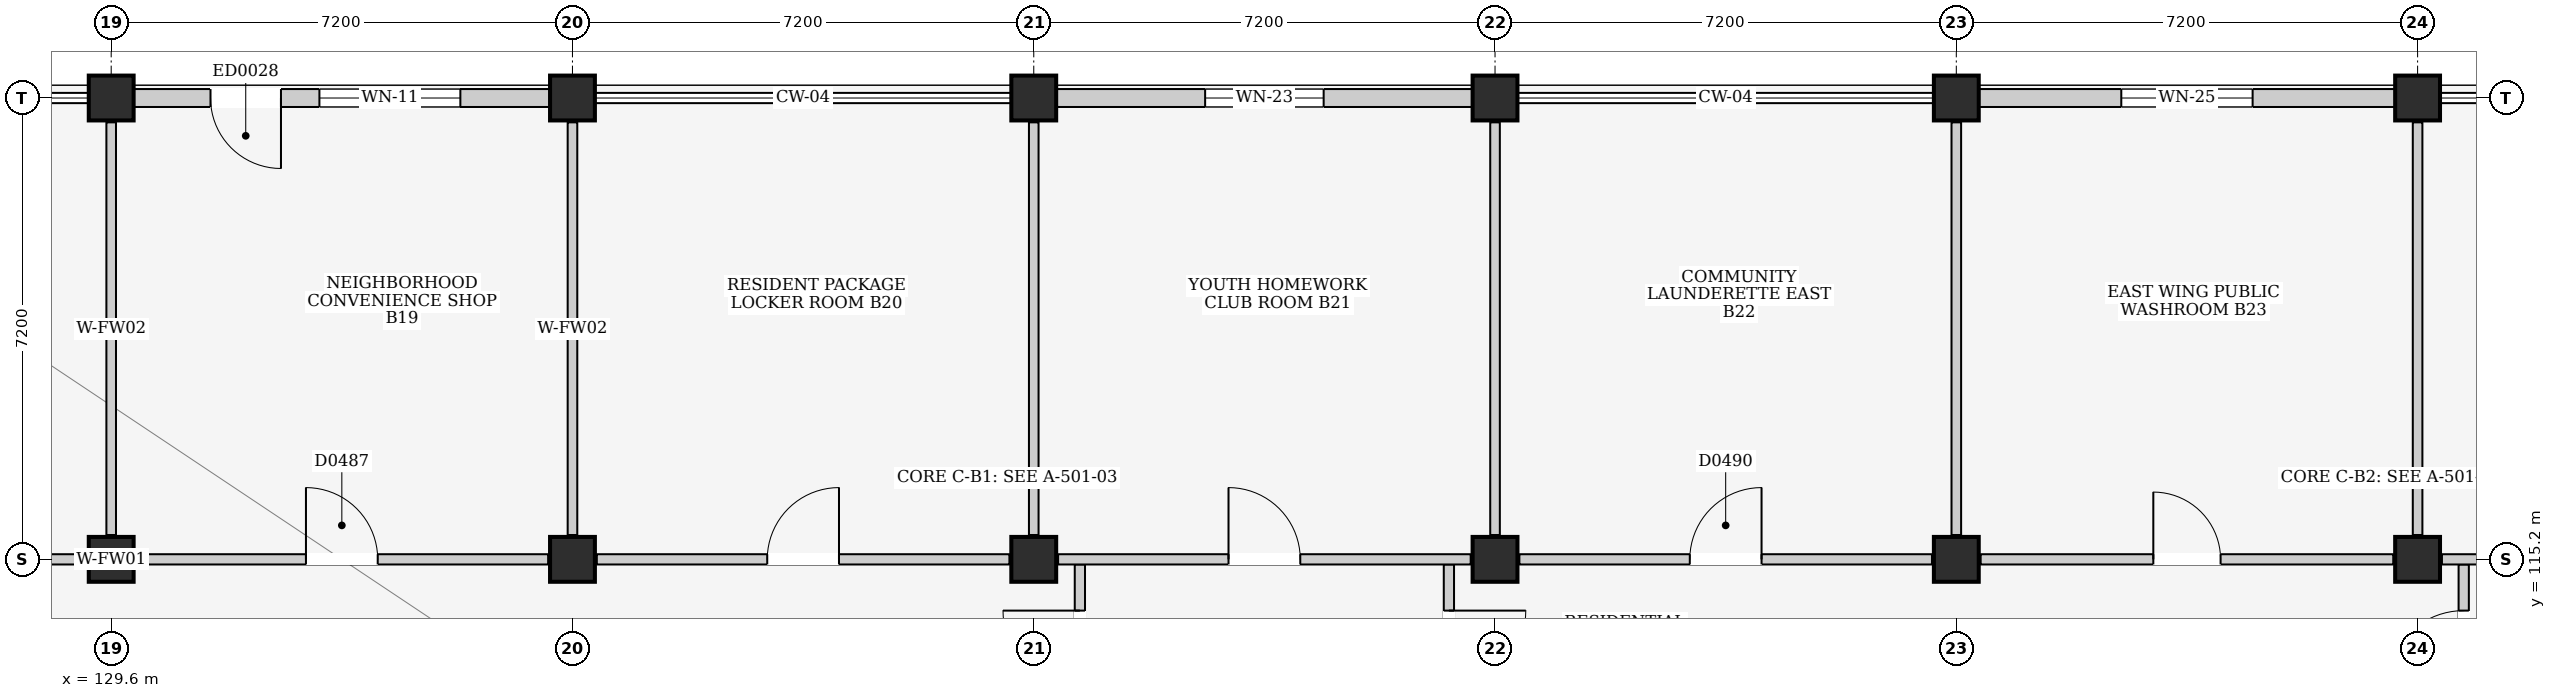
"""IFC4 building model, lengths in metres.
Left out: names, types, materials, properties, quantities, classifications, styles, units other than length and angle.
Written with IfcOpenShell. Run it as: python <this file> out.ifc"""

import sys

from ifc_helpers import new_model, si_unit, direction, frame, frame_2d, origin, origin_2d, place, context, subcontext, project, spatial, rectangle, extrude, element, fill, save


model = new_model("IFC4")
c1 = context("Model", 3, precision=1e-05, world=origin(), true_north=direction((0.0, 1.0)))
c2 = subcontext(c1, "Body", "Model", "MODEL_VIEW")
j1 = project(units=[si_unit("LENGTHUNIT", "METRE"), si_unit("PLANEANGLEUNIT", "RADIAN")], contexts=[c1])
p1 = place(None, origin())
s1 = spatial("IfcSite", under=j1, at=p1, CompositionType="ELEMENT")
p2 = place(p1, origin())
s2 = spatial("IfcBuilding", under=s1, at=p2, CompositionType="ELEMENT")
p3 = place(p2, origin())
s3 = spatial("IfcBuildingStorey", under=s2, at=p3, CompositionType="ELEMENT", Elevation=0.0)
for number, where, z_axis, x_axis in (
    (1, (129.6, 115.2, 0.0), (0.0, 0.0, 1.0), (1.0, 0.0, 0.0)),
    (2, (129.6, 122.4, 0.0), (0.0, 0.0, 1.0), (1.0, 0.0, 0.0)),
    (3, (136.8, 115.2, 0.0), (0.0, 0.0, 1.0), (1.0, 0.0, 0.0)),
    (4, (136.8, 122.4, 0.0), (0.0, 0.0, 1.0), (1.0, 0.0, 0.0)),
    (5, (144.0, 115.2, 0.0), (0.0, 0.0, 1.0), (1.0, 0.0, 0.0)),
    (6, (144.0, 122.4, 0.0), (0.0, 0.0, 1.0), (1.0, 0.0, 0.0)),
    (7, (151.2, 115.2, 0.0), (0.0, 0.0, 1.0), (1.0, 0.0, 0.0)),
    (8, (151.2, 122.4, 0.0), (0.0, 0.0, 1.0), (1.0, 0.0, 0.0)),
    (9, (158.4, 115.2, 0.0), (0.0, 0.0, 1.0), (1.0, 0.0, 0.0)),
    (10, (158.4, 122.4, 0.0), (0.0, 0.0, 1.0), (1.0, 0.0, 0.0)),
    (11, (165.6, 115.2, 0.0), (0.0, 0.0, 1.0), (1.0, 0.0, 0.0)),
    (12, (165.6, 122.4, 0.0), (0.0, 0.0, 1.0), (1.0, 0.0, 0.0)),
):
    element("IfcColumn", number, at=place(p3, frame(where, z_axis=z_axis, x_axis=x_axis)), inside=s3, PredefinedType="COLUMN", context=c2, shape_type="SweptSolid", body=[
        extrude(rectangle(XDim=0.7, YDim=0.7, at=origin_2d()), origin(), (0.0, 0.0, 1.0), 4.5),
    ])
p4 = place(p3, frame((129.95, 122.4, 0.0), z_axis=(0.0, 0.0, 1.0), x_axis=(1.0, 0.0, 0.0)))
e13 = element("IfcWall", 13, at=p4, inside=s3, PredefinedType="ELEMENTEDWALL", context=c2, shape_type="SweptSolid", body=[
    extrude(rectangle(XDim=6.5, YDim=0.28, at=frame_2d((3.25, 0.0))), origin(), (0.0, 0.0, 1.0), 3.665),
])
p5 = place(p4, frame((1.2, 0.0, 0.0)))
e14 = element("IfcOpeningElement", 14, at=p5, cuts=e13, PredefinedType="OPENING", context=c2, shape_type="SweptSolid", body=[
    extrude(rectangle(XDim=1.1, YDim=2.2, at=frame_2d((0.55, 1.1))), frame((0.0, 0.155, 0.0), z_axis=(0.0, -1.0, 0.0), x_axis=(1.0, 0.0, 0.0)), (0.0, 0.0, 1.0), 0.31),
])
p6 = place(p4, frame((2.9, 0.0, 0.85)))
e15 = element("IfcOpeningElement", 15, at=p6, cuts=e13, PredefinedType="OPENING", context=c2, shape_type="SweptSolid", body=[
    extrude(rectangle(XDim=2.2, YDim=1.8, at=frame_2d((1.1, 0.9))), frame((0.0, 0.155, 0.0), z_axis=(0.0, -1.0, 0.0), x_axis=(1.0, 0.0, 0.0)), (0.0, 0.0, 1.0), 0.31),
])
p7 = place(p3, frame((144.35, 122.4, 0.0), z_axis=(0.0, 0.0, 1.0), x_axis=(1.0, 0.0, 0.0)))
e16 = element("IfcWall", 16, at=p7, inside=s3, PredefinedType="ELEMENTEDWALL", context=c2, shape_type="SweptSolid", body=[
    extrude(rectangle(XDim=6.5, YDim=0.28, at=frame_2d((3.25, 0.0))), origin(), (0.0, 0.0, 1.0), 3.665),
])
p8 = place(p7, frame((2.325, 0.0, 0.95)))
e17 = element("IfcOpeningElement", 17, at=p8, cuts=e16, PredefinedType="OPENING", context=c2, shape_type="SweptSolid", body=[
    extrude(rectangle(XDim=1.85, YDim=1.4, at=frame_2d((0.925, 0.7))), frame((0.0, 0.155, 0.0), z_axis=(0.0, -1.0, 0.0), x_axis=(1.0, 0.0, 0.0)), (0.0, 0.0, 1.0), 0.31),
])
p9 = place(p3, frame((158.75, 122.4, 0.0), z_axis=(0.0, 0.0, 1.0), x_axis=(1.0, 0.0, 0.0)))
e18 = element("IfcWall", 18, at=p9, inside=s3, PredefinedType="ELEMENTEDWALL", context=c2, shape_type="SweptSolid", body=[
    extrude(rectangle(XDim=6.5, YDim=0.28, at=frame_2d((3.25, 0.0))), origin(), (0.0, 0.0, 1.0), 3.665),
])
p10 = place(p9, frame((2.225, 0.0, 0.95)))
e19 = element("IfcOpeningElement", 19, at=p10, cuts=e18, PredefinedType="OPENING", context=c2, shape_type="SweptSolid", body=[
    extrude(rectangle(XDim=2.05, YDim=1.6, at=frame_2d((1.025, 0.8))), frame((0.0, 0.155, 0.0), z_axis=(0.0, -1.0, 0.0), x_axis=(1.0, 0.0, 0.0)), (0.0, 0.0, 1.0), 0.31),
])
p11 = place(p3, frame((144.72, 111.1, 0.0), z_axis=(0.0, 0.0, 1.0), x_axis=(0.0, 1.0, 0.0)))
e20 = element("IfcWall", 20, at=p11, inside=s3, PredefinedType="PARTITIONING", context=c2, shape_type="SweptSolid", body=[
    extrude(rectangle(XDim=4.02, YDim=0.16, at=frame_2d((2.01, 0.0))), origin(), (0.0, 0.0, 1.0), 4.2),
])
p12 = place(p11, frame((2.1, 0.0, 0.0)))
e21 = element("IfcOpeningElement", 21, at=p12, cuts=e20, PredefinedType="OPENING", context=c2, shape_type="SweptSolid", body=[
    extrude(rectangle(XDim=1.2, YDim=2.2, at=frame_2d((0.6, 1.1))), frame((0.0, 0.095, 0.0), z_axis=(0.0, -1.0, 0.0), x_axis=(1.0, 0.0, 0.0)), (0.0, 0.0, 1.0), 0.19),
])
p13 = place(p3, frame((150.48, 111.1, 0.0), z_axis=(0.0, 0.0, 1.0), x_axis=(0.0, 1.0, 0.0)))
e22 = element("IfcWall", 22, at=p13, inside=s3, PredefinedType="PARTITIONING", context=c2, shape_type="SweptSolid", body=[
    extrude(rectangle(XDim=4.02, YDim=0.16, at=frame_2d((2.01, 0.0))), origin(), (0.0, 0.0, 1.0), 4.2),
])
p14 = place(p13, frame((2.1, 0.0, 0.0)))
e23 = element("IfcOpeningElement", 23, at=p14, cuts=e22, PredefinedType="OPENING", context=c2, shape_type="SweptSolid", body=[
    extrude(rectangle(XDim=1.2, YDim=2.2, at=frame_2d((0.6, 1.1))), frame((0.0, 0.095, 0.0), z_axis=(0.0, -1.0, 0.0), x_axis=(1.0, 0.0, 0.0)), (0.0, 0.0, 1.0), 0.19),
])
p15 = place(p3, frame((166.32, 110.8, 0.0), z_axis=(0.0, 0.0, 1.0), x_axis=(0.0, 1.0, 0.0)))
e24 = element("IfcWall", 24, at=p15, inside=s3, PredefinedType="PARTITIONING", context=c2, shape_type="SweptSolid", body=[
    extrude(rectangle(XDim=4.32, YDim=0.16, at=frame_2d((2.16, 0.0))), origin(), (0.0, 0.0, 1.0), 4.2),
])
p16 = place(p15, frame((2.4, 0.0, 0.0)))
e25 = element("IfcOpeningElement", 25, at=p16, cuts=e24, PredefinedType="OPENING", context=c2, shape_type="SweptSolid", body=[
    extrude(rectangle(XDim=1.2, YDim=2.2, at=frame_2d((0.6, 1.1))), frame((0.0, 0.095, 0.0), z_axis=(0.0, -1.0, 0.0), x_axis=(1.0, 0.0, 0.0)), (0.0, 0.0, 1.0), 0.19),
])
p17 = place(p3, frame((122.78, 115.2, 0.0), z_axis=(0.0, 0.0, 1.0), x_axis=(1.0, 0.0, 0.0)))
e26 = element("IfcWall", 26, at=p17, inside=s3, PredefinedType="PARTITIONING", context=c2, shape_type="SweptSolid", body=[
    extrude(rectangle(XDim=6.44, YDim=0.16, at=frame_2d((3.22, 0.0))), origin(), (0.0, 0.0, 1.0), 3.435),
])
p18 = place(p17, frame((2.76, 0.0, 0.0)))
e27 = element("IfcOpeningElement", 27, at=p18, cuts=e26, PredefinedType="OPENING", context=c2, shape_type="SweptSolid", body=[
    extrude(rectangle(XDim=1.12, YDim=2.2, at=frame_2d((0.56, 1.1))), frame((0.0, 0.095, 0.0), z_axis=(0.0, -1.0, 0.0), x_axis=(1.0, 0.0, 0.0)), (0.0, 0.0, 1.0), 0.19),
])
p19 = place(p3, frame((129.6, 115.58, 0.0), z_axis=(0.0, 0.0, 1.0), x_axis=(0.0, 1.0, 0.0)))
e28 = element("IfcWall", 28, at=p19, inside=s3, PredefinedType="PARTITIONING", context=c2, shape_type="SweptSolid", body=[
    extrude(rectangle(XDim=6.44, YDim=0.15, at=frame_2d((3.22, 0.0))), origin(), (0.0, 0.0, 1.0), 3.435),
])
p20 = place(p3, frame((129.98, 115.2, 0.0), z_axis=(0.0, 0.0, 1.0), x_axis=(1.0, 0.0, 0.0)))
e29 = element("IfcWall", 29, at=p20, inside=s3, PredefinedType="PARTITIONING", context=c2, shape_type="SweptSolid", body=[
    extrude(rectangle(XDim=6.44, YDim=0.16, at=frame_2d((3.22, 0.0))), origin(), (0.0, 0.0, 1.0), 3.435),
])
p21 = place(p20, frame((2.66, 0.0, 0.0)))
e30 = element("IfcOpeningElement", 30, at=p21, cuts=e29, PredefinedType="OPENING", context=c2, shape_type="SweptSolid", body=[
    extrude(rectangle(XDim=1.12, YDim=2.2, at=frame_2d((0.56, 1.1))), frame((0.0, 0.095, 0.0), z_axis=(0.0, -1.0, 0.0), x_axis=(1.0, 0.0, 0.0)), (0.0, 0.0, 1.0), 0.19),
])
p22 = place(p3, frame((136.8, 115.58, 0.0), z_axis=(0.0, 0.0, 1.0), x_axis=(0.0, 1.0, 0.0)))
e31 = element("IfcWall", 31, at=p22, inside=s3, PredefinedType="PARTITIONING", context=c2, shape_type="SweptSolid", body=[
    extrude(rectangle(XDim=6.44, YDim=0.15, at=frame_2d((3.22, 0.0))), origin(), (0.0, 0.0, 1.0), 3.435),
])
p23 = place(p3, frame((137.18, 115.2, 0.0), z_axis=(0.0, 0.0, 1.0), x_axis=(1.0, 0.0, 0.0)))
e32 = element("IfcWall", 32, at=p23, inside=s3, PredefinedType="PARTITIONING", context=c2, shape_type="SweptSolid", body=[
    extrude(rectangle(XDim=6.44, YDim=0.16, at=frame_2d((3.22, 0.0))), origin(), (0.0, 0.0, 1.0), 3.435),
])
p24 = place(p23, frame((2.66, 0.0, 0.0)))
e33 = element("IfcOpeningElement", 33, at=p24, cuts=e32, PredefinedType="OPENING", context=c2, shape_type="SweptSolid", body=[
    extrude(rectangle(XDim=1.12, YDim=2.2, at=frame_2d((0.56, 1.1))), frame((0.0, 0.095, 0.0), z_axis=(0.0, -1.0, 0.0), x_axis=(1.0, 0.0, 0.0)), (0.0, 0.0, 1.0), 0.19),
])
p25 = place(p3, frame((144.0, 115.58, 0.0), z_axis=(0.0, 0.0, 1.0), x_axis=(0.0, 1.0, 0.0)))
e34 = element("IfcWall", 34, at=p25, inside=s3, PredefinedType="PARTITIONING", context=c2, shape_type="SweptSolid", body=[
    extrude(rectangle(XDim=6.44, YDim=0.15, at=frame_2d((3.22, 0.0))), origin(), (0.0, 0.0, 1.0), 3.435),
])
p26 = place(p3, frame((144.38, 115.2, 0.0), z_axis=(0.0, 0.0, 1.0), x_axis=(1.0, 0.0, 0.0)))
e35 = element("IfcWall", 35, at=p26, inside=s3, PredefinedType="PARTITIONING", context=c2, shape_type="SweptSolid", body=[
    extrude(rectangle(XDim=6.44, YDim=0.16, at=frame_2d((3.22, 0.0))), origin(), (0.0, 0.0, 1.0), 3.435),
])
p27 = place(p26, frame((2.66, 0.0, 0.0)))
e36 = element("IfcOpeningElement", 36, at=p27, cuts=e35, PredefinedType="OPENING", context=c2, shape_type="SweptSolid", body=[
    extrude(rectangle(XDim=1.12, YDim=2.2, at=frame_2d((0.56, 1.1))), frame((0.0, 0.095, 0.0), z_axis=(0.0, -1.0, 0.0), x_axis=(1.0, 0.0, 0.0)), (0.0, 0.0, 1.0), 0.19),
])
p28 = place(p3, frame((151.2, 115.58, 0.0), z_axis=(0.0, 0.0, 1.0), x_axis=(0.0, 1.0, 0.0)))
e37 = element("IfcWall", 37, at=p28, inside=s3, PredefinedType="PARTITIONING", context=c2, shape_type="SweptSolid", body=[
    extrude(rectangle(XDim=6.44, YDim=0.15, at=frame_2d((3.22, 0.0))), origin(), (0.0, 0.0, 1.0), 3.435),
])
p29 = place(p3, frame((151.58, 115.2, 0.0), z_axis=(0.0, 0.0, 1.0), x_axis=(1.0, 0.0, 0.0)))
e38 = element("IfcWall", 38, at=p29, inside=s3, PredefinedType="PARTITIONING", context=c2, shape_type="SweptSolid", body=[
    extrude(rectangle(XDim=6.44, YDim=0.16, at=frame_2d((3.22, 0.0))), origin(), (0.0, 0.0, 1.0), 3.435),
])
p30 = place(p29, frame((2.66, 0.0, 0.0)))
e39 = element("IfcOpeningElement", 39, at=p30, cuts=e38, PredefinedType="OPENING", context=c2, shape_type="SweptSolid", body=[
    extrude(rectangle(XDim=1.12, YDim=2.2, at=frame_2d((0.56, 1.1))), frame((0.0, 0.095, 0.0), z_axis=(0.0, -1.0, 0.0), x_axis=(1.0, 0.0, 0.0)), (0.0, 0.0, 1.0), 0.19),
])
p31 = place(p3, frame((158.4, 115.58, 0.0), z_axis=(0.0, 0.0, 1.0), x_axis=(0.0, 1.0, 0.0)))
e40 = element("IfcWall", 40, at=p31, inside=s3, PredefinedType="PARTITIONING", context=c2, shape_type="SweptSolid", body=[
    extrude(rectangle(XDim=6.44, YDim=0.15, at=frame_2d((3.22, 0.0))), origin(), (0.0, 0.0, 1.0), 3.435),
])
p32 = place(p3, frame((158.78, 115.2, 0.0), z_axis=(0.0, 0.0, 1.0), x_axis=(1.0, 0.0, 0.0)))
e41 = element("IfcWall", 41, at=p32, inside=s3, PredefinedType="PARTITIONING", context=c2, shape_type="SweptSolid", body=[
    extrude(rectangle(XDim=6.44, YDim=0.16, at=frame_2d((3.22, 0.0))), origin(), (0.0, 0.0, 1.0), 3.435),
])
p33 = place(p32, frame((2.695, 0.0, 0.0)))
e42 = element("IfcOpeningElement", 42, at=p33, cuts=e41, PredefinedType="OPENING", context=c2, shape_type="SweptSolid", body=[
    extrude(rectangle(XDim=1.05, YDim=2.15, at=frame_2d((0.525, 1.075))), frame((0.0, 0.095, 0.0), z_axis=(0.0, -1.0, 0.0), x_axis=(1.0, 0.0, 0.0)), (0.0, 0.0, 1.0), 0.19),
])
p34 = place(p3, frame((165.6, 115.58, 0.0), z_axis=(0.0, 0.0, 1.0), x_axis=(0.0, 1.0, 0.0)))
e43 = element("IfcWall", 43, at=p34, inside=s3, PredefinedType="PARTITIONING", context=c2, shape_type="SweptSolid", body=[
    extrude(rectangle(XDim=6.44, YDim=0.15, at=frame_2d((3.22, 0.0))), origin(), (0.0, 0.0, 1.0), 3.435),
])
p35 = place(p3, frame((165.98, 115.2, 0.0), z_axis=(0.0, 0.0, 1.0), x_axis=(1.0, 0.0, 0.0)))
e44 = element("IfcWall", 44, at=p35, inside=s3, PredefinedType="PARTITIONING", context=c2, shape_type="SweptSolid", body=[
    extrude(rectangle(XDim=6.44, YDim=0.16, at=frame_2d((3.22, 0.0))), origin(), (0.0, 0.0, 1.0), 3.435),
])
p36 = place(p35, frame((2.695, 0.0, 0.0)))
e45 = element("IfcOpeningElement", 45, at=p36, cuts=e44, PredefinedType="OPENING", context=c2, shape_type="SweptSolid", body=[
    extrude(rectangle(XDim=1.05, YDim=2.15, at=frame_2d((0.525, 1.075))), frame((0.0, 0.095, 0.0), z_axis=(0.0, -1.0, 0.0), x_axis=(1.0, 0.0, 0.0)), (0.0, 0.0, 1.0), 0.19),
])
p37 = place(p5, frame((1.1, 0.0, 0.0), z_axis=(0.0, 0.0, 1.0), x_axis=(-1.0, 0.0, 0.0)))
e46 = element("IfcDoor", 46, at=p37, inside=s3, OperationType="SINGLE_SWING_LEFT", PredefinedType="DOOR", context=c2, shape_type="SweptSolid", body=[
    extrude(rectangle(XDim=1.1, YDim=2.2, at=frame_2d((0.55, 1.1))), frame((0.0, 0.025, 0.0), z_axis=(0.0, -1.0, 0.0), x_axis=(1.0, 0.0, 0.0)), (0.0, 0.0, 1.0), 0.05),
])
fill(e14, e46)
p38 = place(p6, origin())
e47 = element("IfcWindow", 47, at=p38, inside=s3, PartitioningType="TRIPLE_PANEL_VERTICAL", PredefinedType="WINDOW", context=c2, shape_type="SweptSolid", body=[
    extrude(rectangle(XDim=2.2, YDim=1.8, at=frame_2d((1.1, 0.9))), frame((0.0, 0.03, 0.0), z_axis=(0.0, -1.0, 0.0), x_axis=(1.0, 0.0, 0.0)), (0.0, 0.0, 1.0), 0.06),
])
fill(e15, e47)
p39 = place(p8, origin())
e48 = element("IfcWindow", 48, at=p39, inside=s3, PartitioningType="DOUBLE_PANEL_VERTICAL", PredefinedType="WINDOW", context=c2, shape_type="SweptSolid", body=[
    extrude(rectangle(XDim=1.85, YDim=1.4, at=frame_2d((0.925, 0.7))), frame((0.0, 0.03, 0.0), z_axis=(0.0, -1.0, 0.0), x_axis=(1.0, 0.0, 0.0)), (0.0, 0.0, 1.0), 0.06),
])
fill(e17, e48)
p40 = place(p10, origin())
e49 = element("IfcWindow", 49, at=p40, inside=s3, PartitioningType="DOUBLE_PANEL_VERTICAL", PredefinedType="WINDOW", context=c2, shape_type="SweptSolid", body=[
    extrude(rectangle(XDim=2.05, YDim=1.6, at=frame_2d((1.025, 0.8))), frame((0.0, 0.03, 0.0), z_axis=(0.0, -1.0, 0.0), x_axis=(1.0, 0.0, 0.0)), (0.0, 0.0, 1.0), 0.06),
])
fill(e19, e49)
p41 = place(p12, origin())
e50 = element("IfcDoor", 50, at=p41, inside=s3, OperationType="SINGLE_SWING_RIGHT", PredefinedType="DOOR", context=c2, shape_type="SweptSolid", body=[
    extrude(rectangle(XDim=1.2, YDim=2.2, at=frame_2d((0.6, 1.1))), frame((0.0, 0.025, 0.0), z_axis=(0.0, -1.0, 0.0), x_axis=(1.0, 0.0, 0.0)), (0.0, 0.0, 1.0), 0.05),
])
fill(e21, e50)
p42 = place(p14, frame((1.2, 0.0, 0.0), z_axis=(0.0, 0.0, 1.0), x_axis=(-1.0, 0.0, 0.0)))
e51 = element("IfcDoor", 51, at=p42, inside=s3, OperationType="SINGLE_SWING_LEFT", PredefinedType="DOOR", context=c2, shape_type="SweptSolid", body=[
    extrude(rectangle(XDim=1.2, YDim=2.2, at=frame_2d((0.6, 1.1))), frame((0.0, 0.025, 0.0), z_axis=(0.0, -1.0, 0.0), x_axis=(1.0, 0.0, 0.0)), (0.0, 0.0, 1.0), 0.05),
])
fill(e23, e51)
p43 = place(p16, origin())
e52 = element("IfcDoor", 52, at=p43, inside=s3, OperationType="SINGLE_SWING_LEFT", PredefinedType="DOOR", context=c2, shape_type="SweptSolid", body=[
    extrude(rectangle(XDim=1.2, YDim=2.2, at=frame_2d((0.6, 1.1))), frame((0.0, 0.025, 0.0), z_axis=(0.0, -1.0, 0.0), x_axis=(1.0, 0.0, 0.0)), (0.0, 0.0, 1.0), 0.05),
])
fill(e25, e52)
p44 = place(p21, origin())
e53 = element("IfcDoor", 53, at=p44, inside=s3, OperationType="SINGLE_SWING_LEFT", PredefinedType="DOOR", context=c2, shape_type="SweptSolid", body=[
    extrude(rectangle(XDim=1.12, YDim=2.2, at=frame_2d((0.56, 1.1))), frame((0.0, 0.025, 0.0), z_axis=(0.0, -1.0, 0.0), x_axis=(1.0, 0.0, 0.0)), (0.0, 0.0, 1.0), 0.05),
])
fill(e30, e53)
p45 = place(p24, origin())
e54 = element("IfcDoor", 54, at=p45, inside=s3, OperationType="SINGLE_SWING_RIGHT", PredefinedType="DOOR", context=c2, shape_type="SweptSolid", body=[
    extrude(rectangle(XDim=1.12, YDim=2.2, at=frame_2d((0.56, 1.1))), frame((0.0, 0.025, 0.0), z_axis=(0.0, -1.0, 0.0), x_axis=(1.0, 0.0, 0.0)), (0.0, 0.0, 1.0), 0.05),
])
fill(e33, e54)
p46 = place(p27, origin())
e55 = element("IfcDoor", 55, at=p46, inside=s3, OperationType="SINGLE_SWING_LEFT", PredefinedType="DOOR", context=c2, shape_type="SweptSolid", body=[
    extrude(rectangle(XDim=1.12, YDim=2.2, at=frame_2d((0.56, 1.1))), frame((0.0, 0.025, 0.0), z_axis=(0.0, -1.0, 0.0), x_axis=(1.0, 0.0, 0.0)), (0.0, 0.0, 1.0), 0.05),
])
fill(e36, e55)
p47 = place(p30, origin())
e56 = element("IfcDoor", 56, at=p47, inside=s3, OperationType="SINGLE_SWING_RIGHT", PredefinedType="DOOR", context=c2, shape_type="SweptSolid", body=[
    extrude(rectangle(XDim=1.12, YDim=2.2, at=frame_2d((0.56, 1.1))), frame((0.0, 0.025, 0.0), z_axis=(0.0, -1.0, 0.0), x_axis=(1.0, 0.0, 0.0)), (0.0, 0.0, 1.0), 0.05),
])
fill(e39, e56)
p48 = place(p33, origin())
e57 = element("IfcDoor", 57, at=p48, inside=s3, OperationType="SINGLE_SWING_LEFT", PredefinedType="DOOR", context=c2, shape_type="SweptSolid", body=[
    extrude(rectangle(XDim=1.05, YDim=2.15, at=frame_2d((0.525, 1.075))), frame((0.0, 0.025, 0.0), z_axis=(0.0, -1.0, 0.0), x_axis=(1.0, 0.0, 0.0)), (0.0, 0.0, 1.0), 0.05),
])
fill(e42, e57)
save(model, sys.argv[1])
